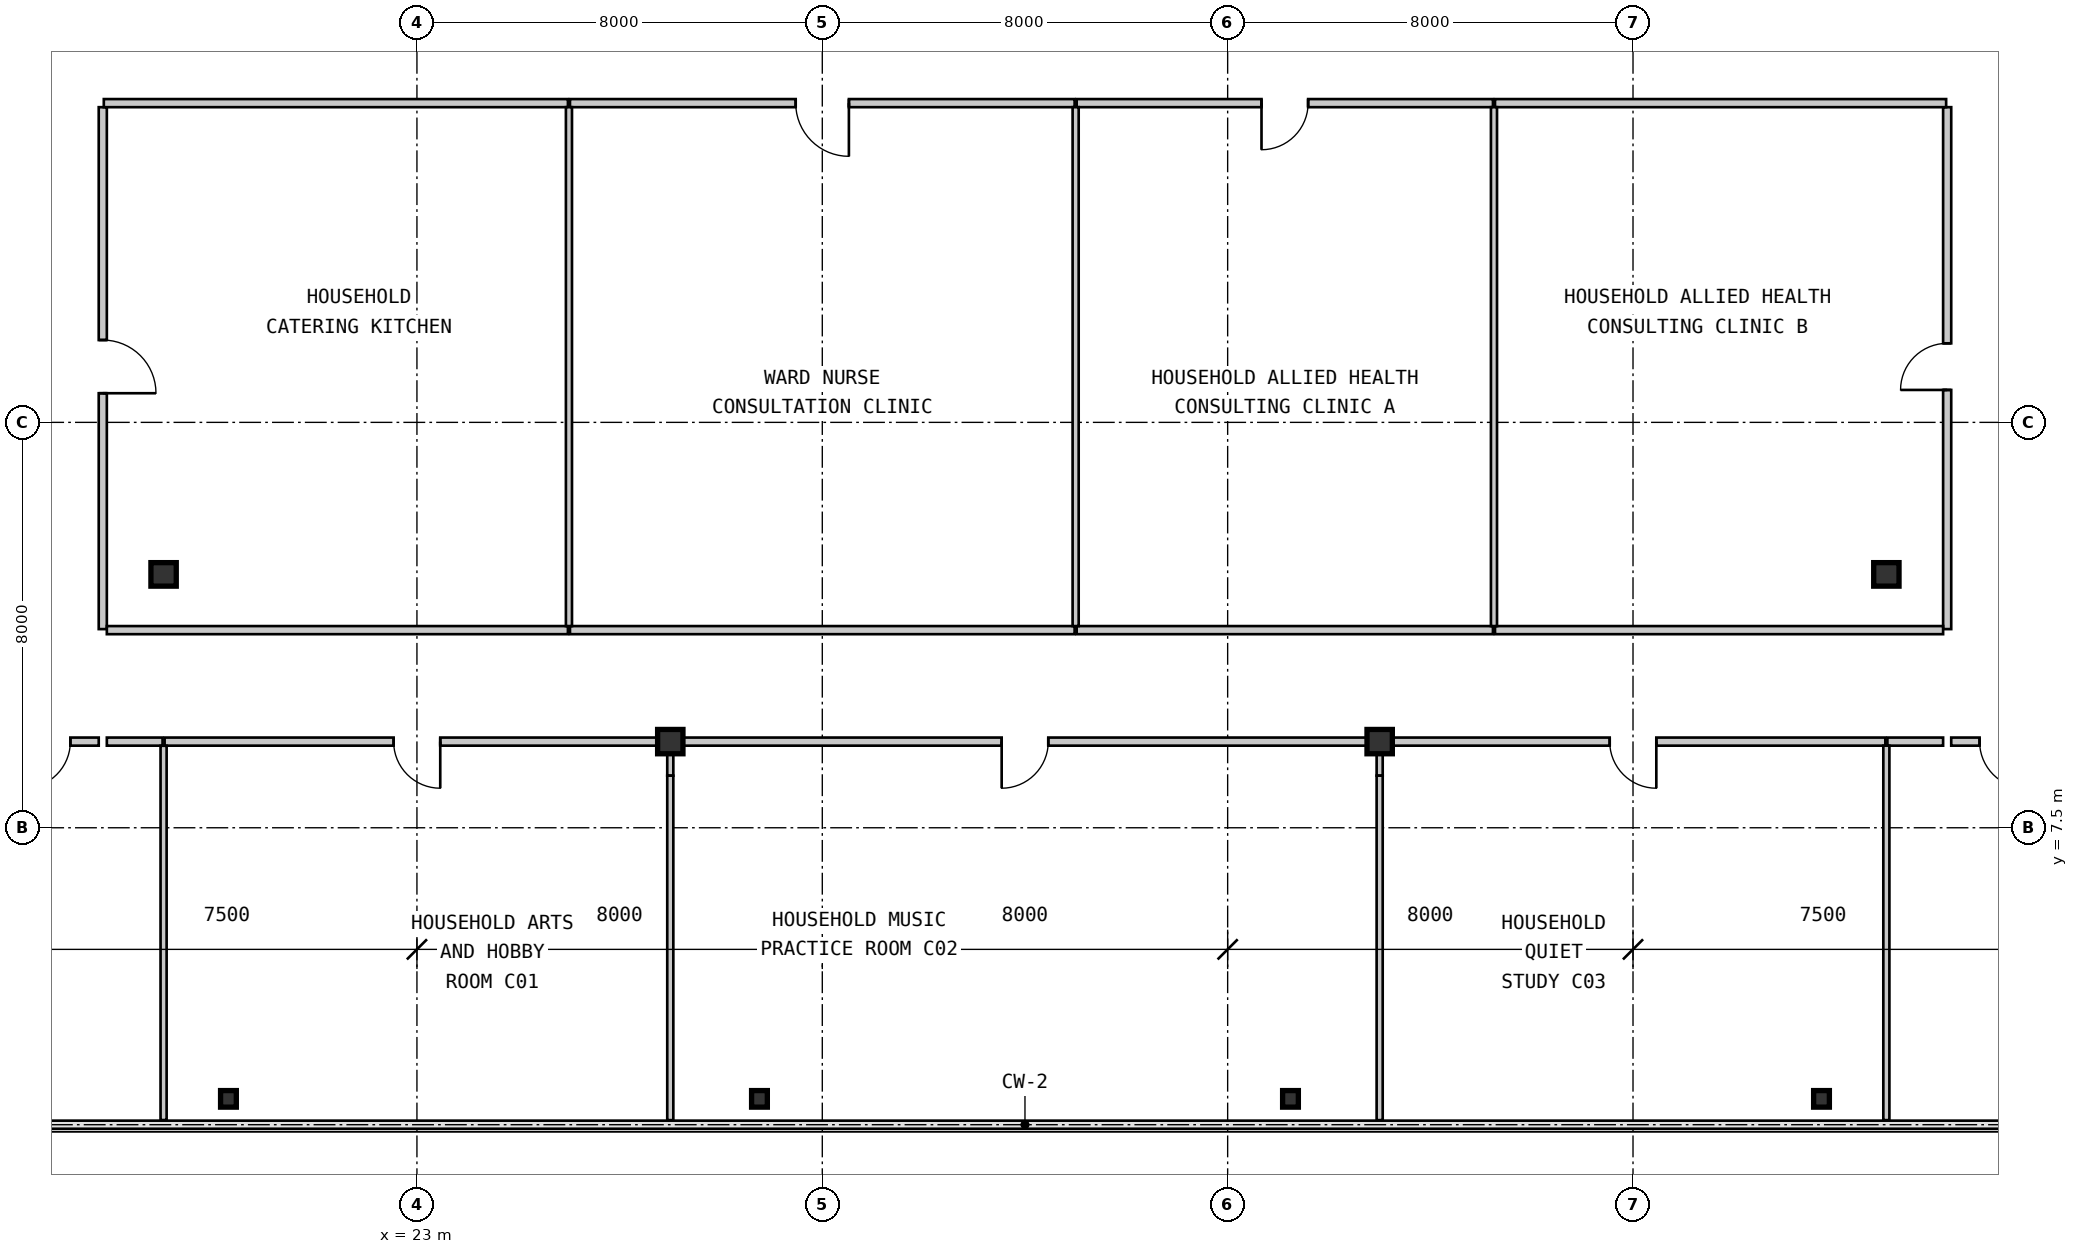
"""IFC4 building model, lengths in metres.
Left out: names, types, materials, properties, quantities, classifications, styles, units other than length and angle.
Written with IfcOpenShell. Run it as: python <this file> out.ifc"""

import sys

from ifc_helpers import new_model, si_unit, direction, frame, frame_2d, origin, origin_2d, place, context, subcontext, project, spatial, rectangle, i_section, extrude, source, transform, mapped, element, fill, save


model = new_model("IFC4")
c1 = context("Model", 3, precision=1e-05, world=origin(), true_north=direction((0.0, 1.0)))
c2 = subcontext(c1, "Body", "Model", "MODEL_VIEW")
j1 = project(units=[si_unit("LENGTHUNIT", "METRE"), si_unit("PLANEANGLEUNIT", "RADIAN")], contexts=[c1])
p1 = place(None, origin())
s1 = spatial("IfcSite", under=j1, at=p1, CompositionType="ELEMENT")
p2 = place(p1, origin())
s2 = spatial("IfcBuilding", under=s1, at=p2, CompositionType="ELEMENT")
p3 = place(p2, frame((0.0, 0.0, 57.75)))
s3 = spatial("IfcBuildingStorey", under=s2, at=p3, CompositionType="ELEMENT", Elevation=57.75)
m1 = source(origin(), c2, "Body", "SweptSolid", [
    extrude(i_section(OverallWidth=0.5, OverallDepth=0.48, WebThickness=0.028, FlangeThickness=0.044, at=origin_2d()), origin(), (0.0, 0.0, 1.0), 3.15),
])
for number, where, z_axis, x_axis in (
    (1, (28.0, 9.2, 0.0), (0.0, 0.0, 1.0), (1.0, 0.0, 0.0)),
    (2, (42.0, 9.2, 0.0), (0.0, 0.0, 1.0), (1.0, 0.0, 0.0)),
):
    element("IfcColumn", number, at=place(p3, frame(where, z_axis=z_axis, x_axis=x_axis)), inside=s3, PredefinedType="COLUMN", context=c2, shape_type="MappedRepresentation", body=[
        mapped(m1, transform((0.0, 0.0, 0.0), scale=1.0)),
    ])
m2 = source(origin(), c2, "Body", "SweptSolid", [
    extrude(i_section(OverallWidth=0.5, OverallDepth=0.464, WebThickness=0.022, FlangeThickness=0.034, at=origin_2d()), origin(), (0.0, 0.0, 1.0), 3.15),
])
for number, where, z_axis, x_axis in (
    (3, (18.0, 12.5, 0.0), (0.0, 0.0, 1.0), (1.0, 0.0, 0.0)),
    (4, (52.0, 12.5, 0.0), (0.0, 0.0, 1.0), (1.0, 0.0, 0.0)),
):
    element("IfcColumn", number, at=place(p3, frame(where, z_axis=z_axis, x_axis=x_axis)), inside=s3, PredefinedType="COLUMN", context=c2, shape_type="MappedRepresentation", body=[
        mapped(m2, transform((0.0, 0.0, 0.0), scale=1.0)),
    ])
m3 = source(origin(), c2, "Body", "SweptSolid", [
    extrude(i_section(OverallWidth=0.311, OverallDepth=0.327, WebThickness=0.016, FlangeThickness=0.025, at=origin_2d()), origin(), (0.0, 0.0, 1.0), 3.15),
])
for number, where, z_axis, x_axis in (
    (5, (19.28, 2.15, 0.0), (0.0, 0.0, 1.0), (1.0, 0.0, 0.0)),
    (6, (29.76, 2.15, 0.0), (0.0, 0.0, 1.0), (1.0, 0.0, 0.0)),
    (7, (40.24, 2.15, 0.0), (0.0, 0.0, 1.0), (1.0, 0.0, 0.0)),
    (8, (50.72, 2.15, 0.0), (0.0, 0.0, 1.0), (1.0, 0.0, 0.0)),
):
    element("IfcColumn", number, at=place(p3, frame(where, z_axis=z_axis, x_axis=x_axis)), inside=s3, PredefinedType="COLUMN", context=c2, shape_type="MappedRepresentation", body=[
        mapped(m3, transform((0.0, 0.0, 0.0), scale=1.0)),
    ])
m4 = source(origin(), c2, "Body", "SweptSolid", [
    extrude(rectangle(XDim=10.3, YDim=0.16, at=frame_2d((5.15, 0.0))), origin(), (0.0, 0.0, 1.0), 2.87),
])
p4 = place(p3, frame((16.8, 21.72, 0.0), z_axis=(0.0, 0.0, 1.0), x_axis=(0.0, -1.0, 0.0)))
e9 = element("IfcWall", 9, at=p4, inside=s3, PredefinedType="PARTITIONING", context=c2, shape_type="MappedRepresentation", body=[
    mapped(m4, transform((0.0, 0.0, 0.0), scale=1.0)),
])
m5 = source(origin(), c2, "Body", "SweptSolid", [
    extrude(rectangle(XDim=1.05, YDim=2.1, at=frame_2d((0.525, 1.05))), frame((0.0, 0.09, 0.0), z_axis=(0.0, -1.0, 0.0), x_axis=(1.0, 0.0, 0.0)), (0.0, 0.0, 1.0), 0.18),
])
p5 = place(p4, frame((4.595, 0.0, 0.0)))
e10 = element("IfcOpeningElement", 10, at=p5, cuts=e9, PredefinedType="OPENING", context=c2, shape_type="MappedRepresentation", body=[
    mapped(m5, transform((0.0, 0.0, 0.0), scale=1.0)),
])
m6 = source(origin(), c2, "Body", "SweptSolid", [
    extrude(rectangle(XDim=9.159, YDim=0.16, at=frame_2d((4.58, 0.0))), origin(), (0.0, 0.0, 1.0), 2.87),
])
p6 = place(p3, frame((25.98, 21.8, 0.0), z_axis=(0.0, 0.0, 1.0), x_axis=(-1.0, 0.0, 0.0)))
e11 = element("IfcWall", 11, at=p6, inside=s3, PredefinedType="PARTITIONING", context=c2, shape_type="MappedRepresentation", body=[
    mapped(m6, transform((0.0, 0.0, 0.0), scale=1.0)),
])
m7 = source(origin(), c2, "Body", "SweptSolid", [
    extrude(rectangle(XDim=9.959, YDim=0.16, at=frame_2d((4.98, 0.0))), origin(), (0.0, 0.0, 1.0), 2.87),
])
p7 = place(p3, frame((35.98, 21.8, 0.0), z_axis=(0.0, 0.0, 1.0), x_axis=(-1.0, 0.0, 0.0)))
e12 = element("IfcWall", 12, at=p7, inside=s3, PredefinedType="PARTITIONING", context=c2, shape_type="MappedRepresentation", body=[
    mapped(m7, transform((0.0, 0.0, 0.0), scale=1.0)),
])
p8 = place(p7, frame((4.455, 0.0, 0.0)))
e13 = element("IfcOpeningElement", 13, at=p8, cuts=e12, PredefinedType="OPENING", context=c2, shape_type="MappedRepresentation", body=[
    mapped(m5, transform((0.0, 0.0, 0.0), scale=1.0)),
])
m8 = source(origin(), c2, "Body", "SweptSolid", [
    extrude(rectangle(XDim=8.216, YDim=0.16, at=frame_2d((4.108, 0.0))), origin(), (0.0, 0.0, 1.0), 2.87),
])
p9 = place(p3, frame((44.236, 21.8, 0.0), z_axis=(0.0, 0.0, 1.0), x_axis=(-1.0, 0.0, 0.0)))
e14 = element("IfcWall", 14, at=p9, inside=s3, PredefinedType="PARTITIONING", context=c2, shape_type="MappedRepresentation", body=[
    mapped(m8, transform((0.0, 0.0, 0.0), scale=1.0)),
])
m9 = source(origin(), c2, "Body", "SweptSolid", [
    extrude(rectangle(XDim=0.92, YDim=2.1, at=frame_2d((0.46, 1.05))), frame((0.0, 0.09, 0.0), z_axis=(0.0, -1.0, 0.0), x_axis=(1.0, 0.0, 0.0)), (0.0, 0.0, 1.0), 0.18),
])
p10 = place(p9, frame((3.648, 0.0, 0.0)))
e15 = element("IfcOpeningElement", 15, at=p10, cuts=e14, PredefinedType="OPENING", context=c2, shape_type="MappedRepresentation", body=[
    mapped(m9, transform((0.0, 0.0, 0.0), scale=1.0)),
])
m10 = source(origin(), c2, "Body", "SweptSolid", [
    extrude(rectangle(XDim=10.3, YDim=0.16, at=frame_2d((5.15, 0.0))), origin(), (0.0, 0.0, 1.0), 2.87),
])
p11 = place(p3, frame((53.2, 11.42, 0.0), z_axis=(0.0, 0.0, 1.0), x_axis=(0.0, 1.0, 0.0)))
e16 = element("IfcWall", 16, at=p11, inside=s3, PredefinedType="PARTITIONING", context=c2, shape_type="MappedRepresentation", body=[
    mapped(m10, transform((0.0, 0.0, 0.0), scale=1.0)),
])
p12 = place(p11, frame((4.72, 0.0, 0.0)))
e17 = element("IfcOpeningElement", 17, at=p12, cuts=e16, PredefinedType="OPENING", context=c2, shape_type="MappedRepresentation", body=[
    mapped(m9, transform((0.0, 0.0, 0.0), scale=1.0)),
])
m11 = source(origin(), c2, "Body", "SweptSolid", [
    extrude(rectangle(XDim=8.904, YDim=0.16, at=frame_2d((4.452, 0.0))), origin(), (0.0, 0.0, 1.0), 2.87),
])
p13 = place(p3, frame((53.18, 21.8, 0.0), z_axis=(0.0, 0.0, 1.0), x_axis=(-1.0, 0.0, 0.0)))
e18 = element("IfcWall", 18, at=p13, inside=s3, PredefinedType="PARTITIONING", context=c2, shape_type="MappedRepresentation", body=[
    mapped(m11, transform((0.0, 0.0, 0.0), scale=1.0)),
])
m12 = source(origin(), c2, "Body", "SweptSolid", [
    extrude(rectangle(XDim=2.04, YDim=0.16, at=frame_2d((1.02, 0.0))), origin(), (0.0, 0.0, 1.0), 2.87),
])
p14 = place(p3, frame((16.72, 9.2, 0.0), z_axis=(0.0, 0.0, 1.0), x_axis=(-1.0, 0.0, 0.0)))
e19 = element("IfcWall", 19, at=p14, inside=s3, PredefinedType="PARTITIONING", context=c2, shape_type="MappedRepresentation", body=[
    mapped(m12, transform((0.0, 0.0, 0.0), scale=1.0)),
])
p15 = place(p14, frame((0.56, 0.0, 0.0)))
e20 = element("IfcOpeningElement", 20, at=p15, cuts=e19, PredefinedType="OPENING", context=c2, shape_type="MappedRepresentation", body=[
    mapped(m9, transform((0.0, 0.0, 0.0), scale=1.0)),
])
p16 = place(p3, frame((55.32, 9.2, 0.0), z_axis=(0.0, 0.0, 1.0), x_axis=(-1.0, 0.0, 0.0)))
e21 = element("IfcWall", 21, at=p16, inside=s3, PredefinedType="PARTITIONING", context=c2, shape_type="MappedRepresentation", body=[
    mapped(m12, transform((0.0, 0.0, 0.0), scale=1.0)),
])
p17 = place(p16, frame((0.56, 0.0, 0.0)))
e22 = element("IfcOpeningElement", 22, at=p17, cuts=e21, PredefinedType="OPENING", context=c2, shape_type="MappedRepresentation", body=[
    mapped(m9, transform((0.0, 0.0, 0.0), scale=1.0)),
])
m13 = source(origin(), c2, "Body", "SweptSolid", [
    extrude(rectangle(XDim=9.1, YDim=0.16, at=frame_2d((4.55, 0.0))), origin(), (0.0, 0.0, 1.0), 2.87),
])
p18 = place(p3, frame((16.88, 11.4, 0.0), z_axis=(0.0, 0.0, 1.0), x_axis=(1.0, 0.0, 0.0)))
e23 = element("IfcWall", 23, at=p18, inside=s3, PredefinedType="PARTITIONING", context=c2, shape_type="MappedRepresentation", body=[
    mapped(m13, transform((0.0, 0.0, 0.0), scale=1.0)),
])
p19 = place(p3, frame((26.02, 11.4, 0.0), z_axis=(0.0, 0.0, 1.0), x_axis=(1.0, 0.0, 0.0)))
e24 = element("IfcWall", 24, at=p19, inside=s3, PredefinedType="PARTITIONING", context=c2, shape_type="MappedRepresentation", body=[
    mapped(m7, transform((0.0, 0.0, 0.0), scale=1.0)),
])
p20 = place(p3, frame((36.02, 11.4, 0.0), z_axis=(0.0, 0.0, 1.0), x_axis=(1.0, 0.0, 0.0)))
e25 = element("IfcWall", 25, at=p20, inside=s3, PredefinedType="PARTITIONING", context=c2, shape_type="MappedRepresentation", body=[
    mapped(m8, transform((0.0, 0.0, 0.0), scale=1.0)),
])
m14 = source(origin(), c2, "Body", "SweptSolid", [
    extrude(rectangle(XDim=8.844, YDim=0.16, at=frame_2d((4.422, 0.0))), origin(), (0.0, 0.0, 1.0), 2.87),
])
p21 = place(p3, frame((44.276, 11.4, 0.0), z_axis=(0.0, 0.0, 1.0), x_axis=(1.0, 0.0, 0.0)))
e26 = element("IfcWall", 26, at=p21, inside=s3, PredefinedType="PARTITIONING", context=c2, shape_type="MappedRepresentation", body=[
    mapped(m14, transform((0.0, 0.0, 0.0), scale=1.0)),
])
m15 = source(origin(), c2, "Body", "SweptSolid", [
    extrude(rectangle(XDim=1.1, YDim=0.16, at=frame_2d((0.55, 0.0))), origin(), (0.0, 0.0, 1.0), 2.87),
])
p22 = place(p3, frame((17.98, 9.2, 0.0), z_axis=(0.0, 0.0, 1.0), x_axis=(-1.0, 0.0, 0.0)))
e27 = element("IfcWall", 27, at=p22, inside=s3, PredefinedType="PARTITIONING", context=c2, shape_type="MappedRepresentation", body=[
    mapped(m15, transform((0.0, 0.0, 0.0), scale=1.0)),
])
p23 = place(p3, frame((27.98, 9.2, 0.0), z_axis=(0.0, 0.0, 1.0), x_axis=(-1.0, 0.0, 0.0)))
e28 = element("IfcWall", 28, at=p23, inside=s3, PredefinedType="PARTITIONING", context=c2, shape_type="MappedRepresentation", body=[
    mapped(m7, transform((0.0, 0.0, 0.0), scale=1.0)),
])
p24 = place(p23, frame((4.52, 0.0, 0.0)))
e29 = element("IfcOpeningElement", 29, at=p24, cuts=e28, PredefinedType="OPENING", context=c2, shape_type="MappedRepresentation", body=[
    mapped(m9, transform((0.0, 0.0, 0.0), scale=1.0)),
])
m16 = source(origin(), c2, "Body", "SweptSolid", [
    extrude(rectangle(XDim=13.959, YDim=0.16, at=frame_2d((6.98, 0.0))), origin(), (0.0, 0.0, 1.0), 2.268),
])
p25 = place(p3, frame((41.98, 9.2, 0.0), z_axis=(0.0, 0.0, 1.0), x_axis=(-1.0, 0.0, 0.0)))
e30 = element("IfcWall", 30, at=p25, inside=s3, PredefinedType="PARTITIONING", context=c2, shape_type="MappedRepresentation", body=[
    mapped(m16, transform((0.0, 0.0, 0.0), scale=1.0)),
])
p26 = place(p25, frame((6.52, 0.0, 0.0)))
e31 = element("IfcOpeningElement", 31, at=p26, cuts=e30, PredefinedType="OPENING", context=c2, shape_type="MappedRepresentation", body=[
    mapped(m9, transform((0.0, 0.0, 0.0), scale=1.0)),
])
p27 = place(p3, frame((51.98, 9.2, 0.0), z_axis=(0.0, 0.0, 1.0), x_axis=(-1.0, 0.0, 0.0)))
e32 = element("IfcWall", 32, at=p27, inside=s3, PredefinedType="PARTITIONING", context=c2, shape_type="MappedRepresentation", body=[
    mapped(m7, transform((0.0, 0.0, 0.0), scale=1.0)),
])
p28 = place(p27, frame((4.52, 0.0, 0.0)))
e33 = element("IfcOpeningElement", 33, at=p28, cuts=e32, PredefinedType="OPENING", context=c2, shape_type="MappedRepresentation", body=[
    mapped(m9, transform((0.0, 0.0, 0.0), scale=1.0)),
])
p29 = place(p3, frame((53.12, 9.2, 0.0), z_axis=(0.0, 0.0, 1.0), x_axis=(-1.0, 0.0, 0.0)))
e34 = element("IfcWall", 34, at=p29, inside=s3, PredefinedType="PARTITIONING", context=c2, shape_type="MappedRepresentation", body=[
    mapped(m15, transform((0.0, 0.0, 0.0), scale=1.0)),
])
m17 = source(origin(), c2, "Body", "SweptSolid", [
    extrude(rectangle(XDim=10.24, YDim=0.12, at=frame_2d((5.12, 0.0))), origin(), (0.0, 0.0, 1.0), 2.87),
])
for number, where, z_axis, x_axis in (
    (35, (26.0, 21.72, 0.0), (0.0, 0.0, 1.0), (0.0, -1.0, 0.0)),
    (36, (36.0, 21.72, 0.0), (0.0, 0.0, 1.0), (0.0, -1.0, 0.0)),
    (37, (44.256, 21.72, 0.0), (0.0, 0.0, 1.0), (0.0, -1.0, 0.0)),
):
    element("IfcWall", number, at=place(p3, frame(where, z_axis=z_axis, x_axis=x_axis)), inside=s3, PredefinedType="PARTITIONING", context=c2, shape_type="MappedRepresentation", body=[
        mapped(m17, transform((0.0, 0.0, 0.0), scale=1.0)),
    ])
m18 = source(origin(), c2, "Body", "SweptSolid", [
    extrude(rectangle(XDim=7.386, YDim=0.12, at=frame_2d((3.693, 0.0))), origin(), (0.0, 0.0, 1.0), 2.87),
])
p30 = place(p3, frame((18.0, 9.118, 0.0), z_axis=(0.0, 0.0, 1.0), x_axis=(0.0, -1.0, 0.0)))
e38 = element("IfcWall", 38, at=p30, inside=s3, PredefinedType="PARTITIONING", context=c2, shape_type="MappedRepresentation", body=[
    mapped(m18, transform((0.0, 0.0, 0.0), scale=1.0)),
])
m19 = source(origin(), c2, "Body", "SweptSolid", [
    extrude(rectangle(XDim=0.592, YDim=0.12, at=frame_2d((0.296, 0.0))), origin(), (0.0, 0.0, 1.0), 2.337),
])
p31 = place(p3, frame((28.0, 9.12, 0.0), z_axis=(0.0, 0.0, 1.0), x_axis=(0.0, -1.0, 0.0)))
e39 = element("IfcWall", 39, at=p31, inside=s3, PredefinedType="PARTITIONING", context=c2, shape_type="MappedRepresentation", body=[
    mapped(m19, transform((0.0, 0.0, 0.0), scale=1.0)),
])
m20 = source(origin(), c2, "Body", "SweptSolid", [
    extrude(rectangle(XDim=6.798, YDim=0.12, at=frame_2d((3.399, 0.0))), origin(), (0.0, 0.0, 1.0), 2.87),
])
p32 = place(p3, frame((28.0, 8.528, 0.0), z_axis=(0.0, 0.0, 1.0), x_axis=(0.0, -1.0, 0.0)))
e40 = element("IfcWall", 40, at=p32, inside=s3, PredefinedType="PARTITIONING", context=c2, shape_type="MappedRepresentation", body=[
    mapped(m20, transform((0.0, 0.0, 0.0), scale=1.0)),
])
p33 = place(p3, frame((42.0, 9.12, 0.0), z_axis=(0.0, 0.0, 1.0), x_axis=(0.0, -1.0, 0.0)))
e41 = element("IfcWall", 41, at=p33, inside=s3, PredefinedType="PARTITIONING", context=c2, shape_type="MappedRepresentation", body=[
    mapped(m19, transform((0.0, 0.0, 0.0), scale=1.0)),
])
p34 = place(p3, frame((42.0, 8.528, 0.0), z_axis=(0.0, 0.0, 1.0), x_axis=(0.0, -1.0, 0.0)))
e42 = element("IfcWall", 42, at=p34, inside=s3, PredefinedType="PARTITIONING", context=c2, shape_type="MappedRepresentation", body=[
    mapped(m20, transform((0.0, 0.0, 0.0), scale=1.0)),
])
m21 = source(origin(), c2, "Body", "SweptSolid", [
    extrude(rectangle(XDim=7.39, YDim=0.12, at=frame_2d((3.695, 0.0))), origin(), (0.0, 0.0, 1.0), 2.87),
])
p35 = place(p3, frame((52.0, 9.12, 0.0), z_axis=(0.0, 0.0, 1.0), x_axis=(0.0, -1.0, 0.0)))
e43 = element("IfcWall", 43, at=p35, inside=s3, PredefinedType="PARTITIONING", context=c2, shape_type="MappedRepresentation", body=[
    mapped(m21, transform((0.0, 0.0, 0.0), scale=1.0)),
])
m22 = source(origin(), c2, "Body", "SweptSolid", [
    extrude(rectangle(XDim=1.05, YDim=2.1, at=frame_2d((0.525, 1.05))), frame((0.0, 0.025, 0.0), z_axis=(0.0, -1.0, 0.0), x_axis=(1.0, 0.0, 0.0)), (0.0, 0.0, 1.0), 0.05),
])
p36 = place(p5, origin())
e44 = element("IfcDoor", 44, at=p36, inside=s3, OperationType="SINGLE_SWING_RIGHT", PredefinedType="DOOR", context=c2, shape_type="MappedRepresentation", body=[
    mapped(m22, transform((0.0, 0.0, 0.0), scale=1.0)),
])
fill(e10, e44)
p37 = place(p8, origin())
e45 = element("IfcDoor", 45, at=p37, inside=s3, OperationType="SINGLE_SWING_LEFT", PredefinedType="DOOR", context=c2, shape_type="MappedRepresentation", body=[
    mapped(m22, transform((0.0, 0.0, 0.0), scale=1.0)),
])
fill(e13, e45)
m23 = source(origin(), c2, "Body", "SweptSolid", [
    extrude(rectangle(XDim=0.92, YDim=2.1, at=frame_2d((0.46, 1.05))), frame((0.0, 0.025, 0.0), z_axis=(0.0, -1.0, 0.0), x_axis=(1.0, 0.0, 0.0)), (0.0, 0.0, 1.0), 0.05),
])
p38 = place(p10, origin())
e46 = element("IfcDoor", 46, at=p38, inside=s3, OperationType="SINGLE_SWING_RIGHT", PredefinedType="DOOR", context=c2, shape_type="MappedRepresentation", body=[
    mapped(m23, transform((0.0, 0.0, 0.0), scale=1.0)),
])
fill(e15, e46)
p39 = place(p12, origin())
e47 = element("IfcDoor", 47, at=p39, inside=s3, OperationType="SINGLE_SWING_LEFT", PredefinedType="DOOR", context=c2, shape_type="MappedRepresentation", body=[
    mapped(m23, transform((0.0, 0.0, 0.0), scale=1.0)),
])
fill(e17, e47)
p40 = place(p15, origin())
e48 = element("IfcDoor", 48, at=p40, inside=s3, OperationType="SINGLE_SWING_RIGHT", PredefinedType="DOOR", context=c2, shape_type="MappedRepresentation", body=[
    mapped(m23, transform((0.0, 0.0, 0.0), scale=1.0)),
])
fill(e20, e48)
p41 = place(p17, origin())
e49 = element("IfcDoor", 49, at=p41, inside=s3, OperationType="SINGLE_SWING_LEFT", PredefinedType="DOOR", context=c2, shape_type="MappedRepresentation", body=[
    mapped(m23, transform((0.0, 0.0, 0.0), scale=1.0)),
])
fill(e22, e49)
p42 = place(p24, origin())
e50 = element("IfcDoor", 50, at=p42, inside=s3, OperationType="SINGLE_SWING_LEFT", PredefinedType="DOOR", context=c2, shape_type="MappedRepresentation", body=[
    mapped(m23, transform((0.0, 0.0, 0.0), scale=1.0)),
])
fill(e29, e50)
p43 = place(p26, origin())
e51 = element("IfcDoor", 51, at=p43, inside=s3, OperationType="SINGLE_SWING_RIGHT", PredefinedType="DOOR", context=c2, shape_type="MappedRepresentation", body=[
    mapped(m23, transform((0.0, 0.0, 0.0), scale=1.0)),
])
fill(e31, e51)
p44 = place(p28, origin())
e52 = element("IfcDoor", 52, at=p44, inside=s3, OperationType="SINGLE_SWING_LEFT", PredefinedType="DOOR", context=c2, shape_type="MappedRepresentation", body=[
    mapped(m23, transform((0.0, 0.0, 0.0), scale=1.0)),
])
fill(e33, e52)
save(model, sys.argv[1])
